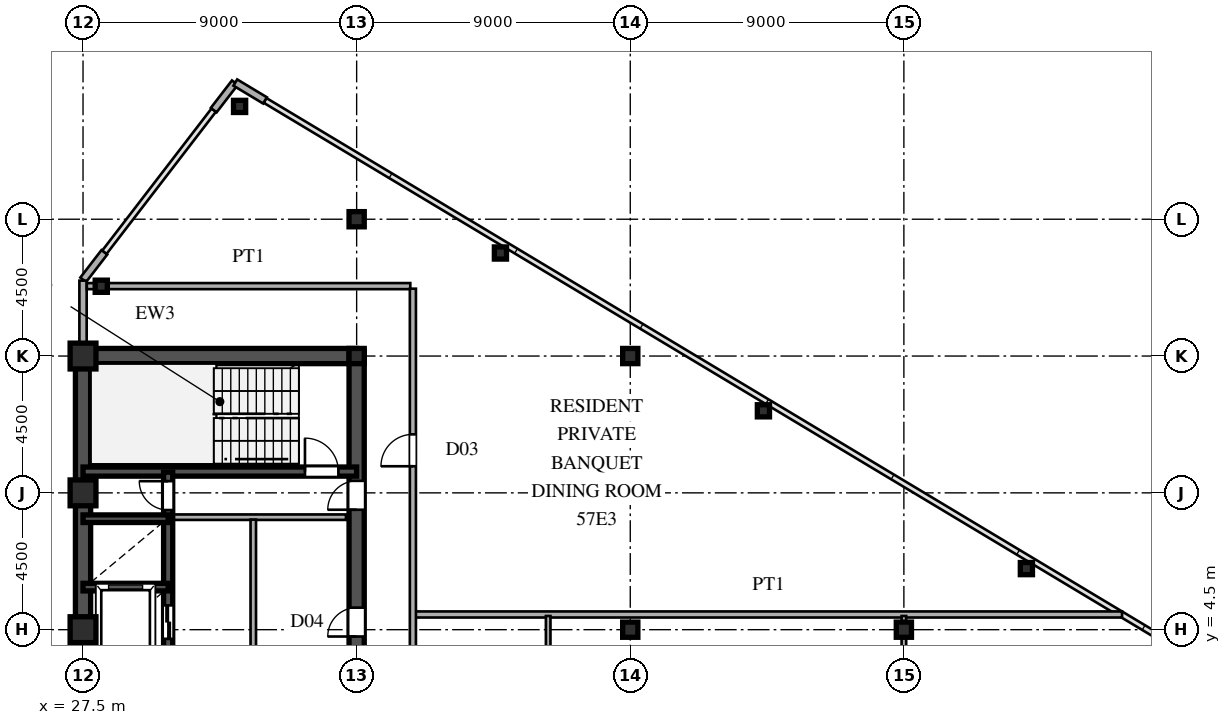
"""IFC4 building model, lengths in metres.
Left out: names, types, materials, properties, quantities, classifications, styles, units other than length and angle.
Written with IfcOpenShell. Run it as: python <this file> out.ifc"""

import sys

from ifc_helpers import new_model, si_unit, direction, frame, frame_2d, origin, origin_2d, place, context, subcontext, project, spatial, rectangle, hollow_rectangle, i_section, extrude, source, transform, mapped, element, fill, save


model = new_model("IFC4")
c1 = context("Model", 3, precision=1e-05, world=origin(), true_north=direction((0.0, 1.0)))
c2 = subcontext(c1, "Body", "Model", "MODEL_VIEW")
j1 = project(units=[si_unit("LENGTHUNIT", "METRE"), si_unit("PLANEANGLEUNIT", "RADIAN")], contexts=[c1])
p1 = place(None, origin())
s1 = spatial("IfcSite", under=j1, at=p1, CompositionType="ELEMENT")
p2 = place(p1, origin())
s2 = spatial("IfcBuilding", under=s1, at=p2, CompositionType="ELEMENT")
p3 = place(p2, frame((0.0, 0.0, 213.9)))
s3 = spatial("IfcBuildingStorey", under=s2, at=p3, CompositionType="ELEMENT", Elevation=213.9)
m1 = source(origin(), c2, "Body", "SweptSolid", [
    extrude(hollow_rectangle(XDim=0.85, YDim=0.85, WallThickness=0.036, at=origin_2d()), origin(), (0.0, 0.0, 1.0), 3.6),
])
for number, where, z_axis, x_axis in (
    (1, (27.5, 4.5, 0.0), (0.0, 0.0, 1.0), (1.0, 0.0, 0.0)),
    (2, (27.5, 9.0, 0.0), (0.0, 0.0, 1.0), (1.0, 0.0, 0.0)),
    (3, (27.5, 13.5, 0.0), (0.0, 0.0, 1.0), (1.0, 0.0, 0.0)),
):
    element("IfcColumn", number, at=place(p3, frame(where, z_axis=z_axis, x_axis=x_axis)), inside=s3, PredefinedType="COLUMN", context=c2, shape_type="MappedRepresentation", body=[
        mapped(m1, transform((0.0, 0.0, 0.0), scale=1.0)),
    ])
m2 = source(origin(), c2, "Body", "SweptSolid", [
    extrude(i_section(OverallWidth=0.5, OverallDepth=0.5, WebThickness=0.02, FlangeThickness=0.032, at=origin_2d()), origin(), (0.0, 0.0, 1.0), 3.6),
])
for number, where, z_axis, x_axis in (
    (4, (36.5, 13.5, 0.0), (0.0, 0.0, 1.0), (1.0, 0.0, 0.0)),
    (5, (36.5, 18.0, 0.0), (0.0, 0.0, 1.0), (1.0, 0.0, 0.0)),
    (6, (45.5, 4.5, 0.0), (0.0, 0.0, 1.0), (1.0, 0.0, 0.0)),
    (7, (45.5, 13.5, 0.0), (0.0, 0.0, 1.0), (1.0, 0.0, 0.0)),
    (8, (54.5, 4.5, 0.0), (0.0, 0.0, 1.0), (1.0, 0.0, 0.0)),
):
    element("IfcColumn", number, at=place(p3, frame(where, z_axis=z_axis, x_axis=x_axis)), inside=s3, PredefinedType="COLUMN", context=c2, shape_type="MappedRepresentation", body=[
        mapped(m2, transform((0.0, 0.0, 0.0), scale=1.0)),
    ])
m3 = source(origin(), c2, "Body", "SweptSolid", [
    extrude(hollow_rectangle(XDim=0.4, YDim=0.4, WallThickness=0.016, at=origin_2d()), origin(), (0.0, 0.0, 1.0), 3.6),
])
for number, where, z_axis, x_axis in (
    (9, (32.65, 21.71, 0.0), (0.0, 0.0, 1.0), (1.0, 0.0, 0.0)),
    (10, (28.1, 15.796, 0.0), (0.0, 0.0, 1.0), (1.0, 0.0, 0.0)),
    (11, (41.23, 16.889, 0.0), (0.0, 0.0, 1.0), (1.0, 0.0, 0.0)),
    (12, (49.88, 11.699, 0.0), (0.0, 0.0, 1.0), (1.0, 0.0, 0.0)),
    (13, (58.53, 6.509, 0.0), (0.0, 0.0, 1.0), (1.0, 0.0, 0.0)),
):
    element("IfcColumn", number, at=place(p3, frame(where, z_axis=z_axis, x_axis=x_axis)), inside=s3, PredefinedType="COLUMN", context=c2, shape_type="MappedRepresentation", body=[
        mapped(m3, transform((0.0, 0.0, 0.0), scale=1.0)),
    ])
for number, where, z_axis, x_axis in (
    (14, (33.486, 21.908, 0.0), (0.0, 0.0, 1.0), (-0.857, 0.515, 0.0)),
    (15, (32.494, 22.492, 0.0), (0.0, 0.0, 1.0), (-0.61, -0.793, 0.0)),
    (16, (28.201, 16.912, 0.0), (0.0, 0.0, 1.0), (-0.61, -0.793, 0.0)),
):
    element("IfcWall", number, at=place(p3, frame(where, z_axis=z_axis, x_axis=x_axis)), inside=s3, PredefinedType="SOLIDWALL", context=c2, shape_type="SweptSolid", body=[
        extrude(rectangle(XDim=1.14, YDim=0.24, at=frame_2d((0.57, 0.0))), origin(), (0.0, 0.0, 1.0), 3.38),
    ])
p4 = place(p3, frame((27.5, 13.755, 0.0), z_axis=(0.0, 0.0, 1.0), x_axis=(0.0, 1.0, 0.0)))
e17 = element("IfcWall", 17, at=p4, inside=s3, PredefinedType="SOLIDWALL", context=c2, shape_type="SweptSolid", body=[
    extrude(rectangle(XDim=0.62, YDim=0.24, at=frame_2d((0.31, 0.0))), origin(), (0.0, 0.0, 1.0), 2.88),
])
p5 = place(p3, frame((27.5, 14.375, 0.0), z_axis=(0.0, 0.0, 1.0), x_axis=(0.0, 1.0, 0.0)))
e18 = element("IfcWall", 18, at=p5, inside=s3, PredefinedType="SOLIDWALL", context=c2, shape_type="SweptSolid", body=[
    extrude(rectangle(XDim=1.605, YDim=0.24, at=frame_2d((0.803, 0.0))), origin(), (0.0, 0.0, 1.0), 3.38),
])
p6 = place(p3, frame((27.5, 1.3, 0.0), z_axis=(0.0, 0.0, 1.0), x_axis=(0.0, 1.0, 0.0)))
e19 = element("IfcWall", 19, at=p6, inside=s3, PredefinedType="SHEAR", context=c2, shape_type="SweptSolid", body=[
    extrude(rectangle(XDim=12.2, YDim=0.5, at=frame_2d((6.1, 0.0))), origin(), (0.0, 0.0, 1.0), 3.38),
])
p7 = place(p3, frame((27.5, 13.5, 0.0), z_axis=(0.0, 0.0, 1.0), x_axis=(1.0, 0.0, 0.0)))
e20 = element("IfcWall", 20, at=p7, inside=s3, PredefinedType="SHEAR", context=c2, shape_type="SweptSolid", body=[
    extrude(rectangle(XDim=9.0, YDim=0.5, at=frame_2d((4.5, 0.0))), origin(), (0.0, 0.0, 1.0), 3.38),
])
p8 = place(p3, frame((36.5, 8.2, 0.0), z_axis=(0.0, 0.0, 1.0), x_axis=(0.0, 1.0, 0.0)))
e21 = element("IfcWall", 21, at=p8, inside=s3, PredefinedType="SHEAR", context=c2, shape_type="SweptSolid", body=[
    extrude(rectangle(XDim=5.45, YDim=0.5, at=frame_2d((2.725, 0.0))), origin(), (0.0, 0.0, 1.0), 3.38),
])
p9 = place(p8, frame((0.245, 0.0, 0.0)))
e22 = element("IfcOpeningElement", 22, at=p9, cuts=e21, PredefinedType="OPENING", context=c2, shape_type="SweptSolid", body=[
    extrude(rectangle(XDim=0.95, YDim=2.15, at=frame_2d((0.475, 1.075))), frame((0.0, 0.26, 0.0), z_axis=(0.0, -1.0, 0.0), x_axis=(1.0, 0.0, 0.0)), (0.0, 0.0, 1.0), 0.52),
])
p10 = place(p3, frame((36.5, 1.3, 0.0), z_axis=(0.0, 0.0, 1.0), x_axis=(0.0, 1.0, 0.0)))
e23 = element("IfcWall", 23, at=p10, inside=s3, PredefinedType="SHEAR", context=c2, shape_type="SweptSolid", body=[
    extrude(rectangle(XDim=6.9, YDim=0.5, at=frame_2d((3.45, 0.0))), origin(), (0.0, 0.0, 1.0), 3.38),
])
p11 = place(p10, frame((2.975, 0.0, 0.0)))
e24 = element("IfcOpeningElement", 24, at=p11, cuts=e23, PredefinedType="OPENING", context=c2, shape_type="SweptSolid", body=[
    extrude(rectangle(XDim=0.95, YDim=2.15, at=frame_2d((0.475, 1.075))), frame((0.0, 0.26, 0.0), z_axis=(0.0, -1.0, 0.0), x_axis=(1.0, 0.0, 0.0)), (0.0, 0.0, 1.0), 0.52),
])
p12 = place(p3, frame((27.5, 9.7, 0.0), z_axis=(0.0, 0.0, 1.0), x_axis=(1.0, 0.0, 0.0)))
e25 = element("IfcWall", 25, at=p12, inside=s3, PredefinedType="SHEAR", context=c2, shape_type="SweptSolid", body=[
    extrude(rectangle(XDim=9.0, YDim=0.3, at=frame_2d((4.5, 0.0))), origin(), (0.0, 0.0, 1.0), 3.38),
])
p13 = place(p12, frame((7.3, 0.0, 0.0)))
e26 = element("IfcOpeningElement", 26, at=p13, cuts=e25, PredefinedType="OPENING", context=c2, shape_type="SweptSolid", body=[
    extrude(rectangle(XDim=1.1, YDim=2.2, at=frame_2d((0.55, 1.1))), frame((0.0, 0.16, 0.0), z_axis=(0.0, -1.0, 0.0), x_axis=(1.0, 0.0, 0.0)), (0.0, 0.0, 1.0), 0.32),
])
for number, where, z_axis, x_axis in (
    (27, (27.5, 5.9, 0.0), (0.0, 0.0, 1.0), (1.0, 0.0, 0.0)),
    (28, (27.5, 8.15, 0.0), (0.0, 0.0, 1.0), (1.0, 0.0, 0.0)),
):
    element("IfcWall", number, at=place(p3, frame(where, z_axis=z_axis, x_axis=x_axis)), inside=s3, PredefinedType="SHEAR", context=c2, shape_type="SweptSolid", body=[
        extrude(rectangle(XDim=2.8, YDim=0.25, at=frame_2d((1.4, 0.0))), origin(), (0.0, 0.0, 1.0), 3.38),
    ])
p14 = place(p3, frame((30.3, 3.6, 0.0), z_axis=(0.0, 0.0, 1.0), x_axis=(0.0, 1.0, 0.0)))
e29 = element("IfcWall", 29, at=p14, inside=s3, PredefinedType="SHEAR", context=c2, shape_type="SweptSolid", body=[
    extrude(rectangle(XDim=2.3, YDim=0.3, at=frame_2d((1.15, 0.0))), origin(), (0.0, 0.0, 1.0), 3.38),
])
p15 = place(p14, frame((0.6, 0.0, 0.0)))
e30 = element("IfcOpeningElement", 30, at=p15, cuts=e29, PredefinedType="OPENING", context=c2, shape_type="SweptSolid", body=[
    extrude(rectangle(XDim=1.1, YDim=2.2, at=frame_2d((0.55, 1.1))), frame((0.0, 0.16, 0.0), z_axis=(0.0, -1.0, 0.0), x_axis=(1.0, 0.0, 0.0)), (0.0, 0.0, 1.0), 0.32),
])
p16 = place(p3, frame((30.3, 5.9, 0.0), z_axis=(0.0, 0.0, 1.0), x_axis=(0.0, 1.0, 0.0)))
e31 = element("IfcWall", 31, at=p16, inside=s3, PredefinedType="SHEAR", context=c2, shape_type="SweptSolid", body=[
    extrude(rectangle(XDim=2.25, YDim=0.3, at=frame_2d((1.125, 0.0))), origin(), (0.0, 0.0, 1.0), 3.38),
])
p17 = place(p3, frame((30.3, 8.15, 0.0), z_axis=(0.0, 0.0, 1.0), x_axis=(0.0, 1.0, 0.0)))
e32 = element("IfcWall", 32, at=p17, inside=s3, PredefinedType="SHEAR", context=c2, shape_type="SweptSolid", body=[
    extrude(rectangle(XDim=1.53, YDim=0.3, at=frame_2d((0.765, 0.0))), origin(), (0.0, 0.0, 1.0), 3.38),
])
p18 = place(p17, frame((0.285, 0.0, 0.0)))
e33 = element("IfcOpeningElement", 33, at=p18, cuts=e32, PredefinedType="OPENING", context=c2, shape_type="SweptSolid", body=[
    extrude(rectangle(XDim=0.95, YDim=2.15, at=frame_2d((0.475, 1.075))), frame((0.0, 0.16, 0.0), z_axis=(0.0, -1.0, 0.0), x_axis=(1.0, 0.0, 0.0)), (0.0, 0.0, 1.0), 0.32),
])
p19 = place(p3, frame((30.45, 8.2, 0.0), z_axis=(0.0, 0.0, 1.0), x_axis=(1.0, 0.0, 0.0)))
e34 = element("IfcWall", 34, at=p19, inside=s3, PredefinedType="PARTITIONING", context=c2, shape_type="SweptSolid", body=[
    extrude(rectangle(XDim=5.7, YDim=0.18, at=frame_2d((2.85, 0.0))), origin(), (0.0, 0.0, 1.0), 3.38),
])
p20 = place(p3, frame((33.1, 1.38, 0.0), z_axis=(0.0, 0.0, 1.0), x_axis=(0.0, 1.0, 0.0)))
e35 = element("IfcWall", 35, at=p20, inside=s3, PredefinedType="PARTITIONING", context=c2, shape_type="SweptSolid", body=[
    extrude(rectangle(XDim=6.74, YDim=0.18, at=frame_2d((3.37, 0.0))), origin(), (0.0, 0.0, 1.0), 3.38),
])
p21 = place(p3, frame((38.43, 5.0, 0.0), z_axis=(0.0, 0.0, 1.0), x_axis=(1.0, 0.0, 0.0)))
e36 = element("IfcWall", 36, at=p21, inside=s3, PredefinedType="PARTITIONING", context=c2, shape_type="SweptSolid", body=[
    extrude(rectangle(XDim=23.246, YDim=0.2, at=frame_2d((11.623, 0.0))), origin(), (0.0, 0.0, 1.0), 3.38),
])
p22 = place(p3, frame((27.625, 15.8, 0.0), z_axis=(0.0, 0.0, 1.0), x_axis=(1.0, 0.0, 0.0)))
e37 = element("IfcWall", 37, at=p22, inside=s3, PredefinedType="PARTITIONING", context=c2, shape_type="SweptSolid", body=[
    extrude(rectangle(XDim=10.64, YDim=0.2, at=frame_2d((5.32, 0.0))), origin(), (0.0, 0.0, 1.0), 3.38),
])
p23 = place(p3, frame((38.35, -15.715, 0.0), z_axis=(0.0, 0.0, 1.0), x_axis=(0.0, 1.0, 0.0)))
e38 = element("IfcWall", 38, at=p23, inside=s3, PredefinedType="PARTITIONING", context=c2, shape_type="SweptSolid", body=[
    extrude(rectangle(XDim=31.43, YDim=0.2, at=frame_2d((15.715, 0.0))), origin(), (0.0, 0.0, 1.0), 3.38),
])
p24 = place(p23, frame((3.09, 0.0, 0.0)))
e39 = element("IfcOpeningElement", 39, at=p24, cuts=e38, PredefinedType="OPENING", context=c2, shape_type="SweptSolid", body=[
    extrude(rectangle(XDim=1.05, YDim=2.25, at=frame_2d((0.525, 1.125))), frame((0.0, 0.11, 0.0), z_axis=(0.0, -1.0, 0.0), x_axis=(1.0, 0.0, 0.0)), (0.0, 0.0, 1.0), 0.22),
])
p25 = place(p23, frame((13.289, 0.0, 0.0)))
e40 = element("IfcOpeningElement", 40, at=p25, cuts=e38, PredefinedType="OPENING", context=c2, shape_type="SweptSolid", body=[
    extrude(rectangle(XDim=1.05, YDim=2.25, at=frame_2d((0.525, 1.125))), frame((0.0, 0.11, 0.0), z_axis=(0.0, -1.0, 0.0), x_axis=(1.0, 0.0, 0.0)), (0.0, 0.0, 1.0), 0.22),
])
p26 = place(p23, frame((25.59, 0.0, 0.0)))
e41 = element("IfcOpeningElement", 41, at=p26, cuts=e38, PredefinedType="OPENING", context=c2, shape_type="SweptSolid", body=[
    extrude(rectangle(XDim=1.05, YDim=2.25, at=frame_2d((0.525, 1.125))), frame((0.0, 0.11, 0.0), z_axis=(0.0, -1.0, 0.0), x_axis=(1.0, 0.0, 0.0)), (0.0, 0.0, 1.0), 0.22),
])
p27 = place(p3, frame((42.8, 1.032, 0.0), z_axis=(0.0, 0.0, 1.0), x_axis=(0.0, 1.0, 0.0)))
e42 = element("IfcWall", 42, at=p27, inside=s3, PredefinedType="PARTITIONING", context=c2, shape_type="SweptSolid", body=[
    extrude(rectangle(XDim=3.918, YDim=0.15, at=frame_2d((1.959, 0.0))), origin(), (0.0, 0.0, 1.0), 3.38),
])
p28 = place(p3, frame((54.5, -8.35, 0.0), z_axis=(0.0, 0.0, 1.0), x_axis=(0.0, 1.0, 0.0)))
e43 = element("IfcWall", 43, at=p28, inside=s3, PredefinedType="PARTITIONING", context=c2, shape_type="SweptSolid", body=[
    extrude(rectangle(XDim=13.3, YDim=0.15, at=frame_2d((6.65, 0.0))), origin(), (0.0, 0.0, 1.0), 2.78),
])
p29 = place(p28, frame((6.175, 0.0, 0.0)))
e44 = element("IfcOpeningElement", 44, at=p29, cuts=e43, PredefinedType="OPENING", context=c2, shape_type="SweptSolid", body=[
    extrude(rectangle(XDim=0.95, YDim=2.15, at=frame_2d((0.475, 1.075))), frame((0.0, 0.085, 0.0), z_axis=(0.0, -1.0, 0.0), x_axis=(1.0, 0.0, 0.0)), (0.0, 0.0, 1.0), 0.17),
])
m4 = source(origin(), c2, "Body", "SweptSolid", [
    extrude(rectangle(XDim=0.95, YDim=2.15, at=frame_2d((0.475, 1.075))), frame((0.0, 0.025, 0.0), z_axis=(0.0, -1.0, 0.0), x_axis=(1.0, 0.0, 0.0)), (0.0, 0.0, 1.0), 0.05),
])
p30 = place(p9, origin())
e45 = element("IfcDoor", 45, at=p30, inside=s3, OperationType="SINGLE_SWING_LEFT", PredefinedType="DOOR", context=c2, shape_type="MappedRepresentation", body=[
    mapped(m4, transform((0.0, 0.0, 0.0), scale=1.0)),
])
fill(e22, e45)
p31 = place(p11, origin())
e46 = element("IfcDoor", 46, at=p31, inside=s3, OperationType="SINGLE_SWING_LEFT", PredefinedType="DOOR", context=c2, shape_type="MappedRepresentation", body=[
    mapped(m4, transform((0.0, 0.0, 0.0), scale=1.0)),
])
fill(e24, e46)
m5 = source(origin(), c2, "Body", "SweptSolid", [
    extrude(rectangle(XDim=1.1, YDim=2.2, at=frame_2d((0.55, 1.1))), frame((0.0, 0.025, 0.0), z_axis=(0.0, -1.0, 0.0), x_axis=(1.0, 0.0, 0.0)), (0.0, 0.0, 1.0), 0.05),
])
p32 = place(p13, origin())
e47 = element("IfcDoor", 47, at=p32, inside=s3, OperationType="SINGLE_SWING_LEFT", PredefinedType="DOOR", context=c2, shape_type="MappedRepresentation", body=[
    mapped(m5, transform((0.0, 0.0, 0.0), scale=1.0)),
])
fill(e26, e47)
m6 = source(origin(), c2, "Body", "SweptSolid", [
    extrude(rectangle(XDim=1.1, YDim=2.2, at=frame_2d((0.55, 1.1))), frame((0.0, 0.025, 0.0), z_axis=(0.0, -1.0, 0.0), x_axis=(1.0, 0.0, 0.0)), (0.0, 0.0, 1.0), 0.05),
])
p33 = place(p15, origin())
e48 = element("IfcDoor", 48, at=p33, inside=s3, OperationType="DOUBLE_DOOR_SLIDING", PredefinedType="DOOR", context=c2, shape_type="MappedRepresentation", body=[
    mapped(m6, transform((0.0, 0.0, 0.0), scale=1.0)),
])
fill(e30, e48)
p34 = place(p18, origin())
e49 = element("IfcDoor", 49, at=p34, inside=s3, OperationType="SINGLE_SWING_RIGHT", PredefinedType="DOOR", context=c2, shape_type="MappedRepresentation", body=[
    mapped(m4, transform((0.0, 0.0, 0.0), scale=1.0)),
])
fill(e33, e49)
m7 = source(origin(), c2, "Body", "SweptSolid", [
    extrude(rectangle(XDim=1.05, YDim=2.25, at=frame_2d((0.525, 1.125))), frame((0.0, 0.025, 0.0), z_axis=(0.0, -1.0, 0.0), x_axis=(1.0, 0.0, 0.0)), (0.0, 0.0, 1.0), 0.05),
])
p35 = place(p26, origin())
e50 = element("IfcDoor", 50, at=p35, inside=s3, OperationType="SINGLE_SWING_LEFT", PredefinedType="DOOR", context=c2, shape_type="MappedRepresentation", body=[
    mapped(m7, transform((0.0, 0.0, 0.0), scale=1.0)),
])
fill(e41, e50)
save(model, sys.argv[1])
